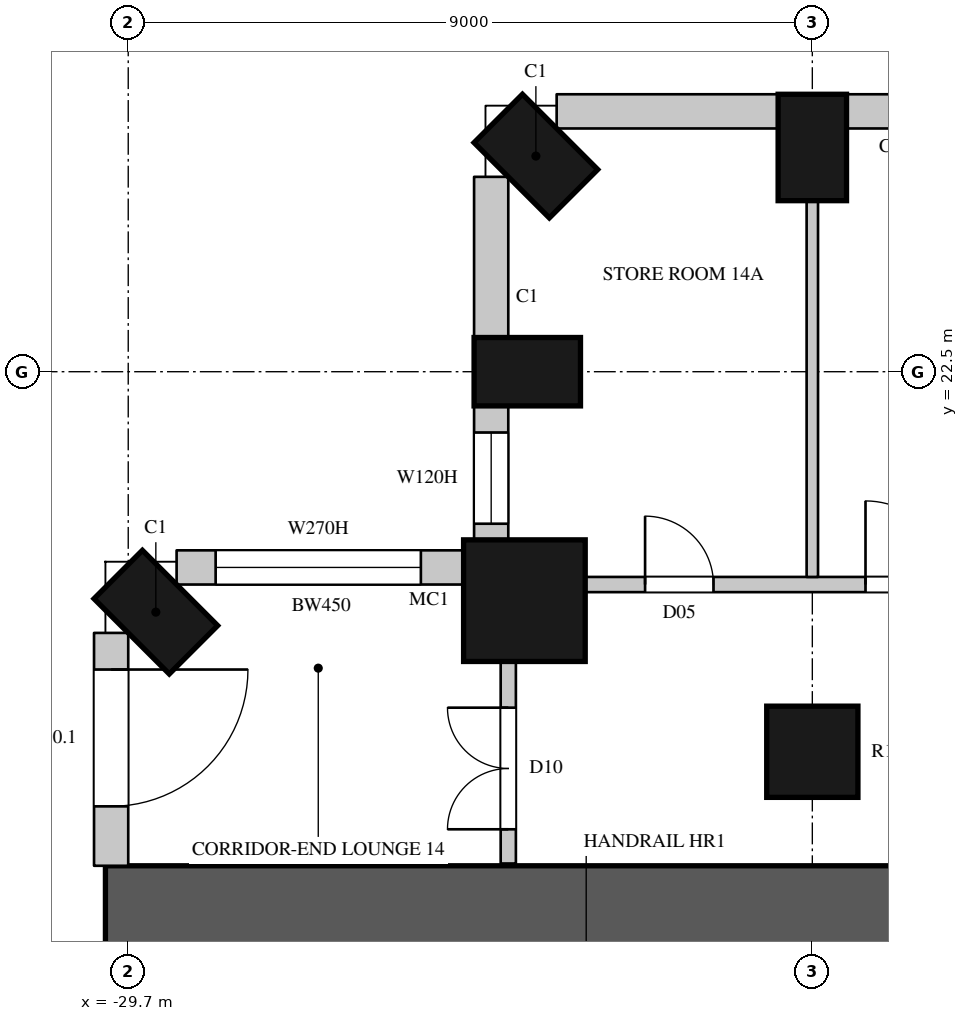
"""IFC4 building model, lengths in metres.
Left out: names, types, materials, properties, quantities, classifications, styles, units other than length and angle.
Written with IfcOpenShell. Run it as: python <this file> out.ifc"""

import sys

from ifc_helpers import new_model, si_unit, direction, frame, frame_2d, origin, origin_2d, place, context, subcontext, project, spatial, rectangle, circle, extrude, element, fill, save


model = new_model("IFC4")
c1 = context("Model", 3, precision=1e-05, world=origin(), true_north=direction((0.0, 1.0)))
c2 = subcontext(c1, "Body", "Model", "MODEL_VIEW")
j1 = project(units=[si_unit("LENGTHUNIT", "METRE"), si_unit("PLANEANGLEUNIT", "RADIAN")], contexts=[c1])
p1 = place(None, origin())
s1 = spatial("IfcSite", under=j1, at=p1, CompositionType="ELEMENT")
p2 = place(p1, origin())
s2 = spatial("IfcBuilding", under=s1, at=p2, CompositionType="ELEMENT")
p3 = place(p2, frame((0.0, 0.0, 80.7)))
s3 = spatial("IfcBuildingStorey", under=s2, at=p3, CompositionType="ELEMENT", Elevation=80.7)
for number, where, z_axis, x_axis in (
    (1, (-29.337, 19.337, 0.0), (0.0, 0.0, 1.0), (-0.707, -0.707, 0.0)),
    (2, (-20.7, 25.45, 0.0), (0.0, 0.0, 1.0), (-1.0, 0.0, 0.0)),
    (3, (-24.337, 25.337, 0.0), (0.0, 0.0, 1.0), (-0.707, -0.707, 0.0)),
    (4, (-24.45, 22.5, 0.0), (0.0, 0.0, 1.0), (0.0, -1.0, 0.0)),
):
    element("IfcColumn", number, at=place(p3, frame(where, z_axis=z_axis, x_axis=x_axis)), inside=s3, PredefinedType="COLUMN", context=c2, shape_type="SweptSolid", body=[
        extrude(rectangle(XDim=0.9, YDim=1.4, at=origin_2d()), origin(), (0.0, 0.0, 1.0), 3.6),
    ])
p4 = place(p3, frame((-24.488, 19.488, 0.0), z_axis=(0.0, 0.0, 1.0), x_axis=(1.0, 0.0, 0.0)))
e5 = element("IfcColumn", 5, at=p4, inside=s3, PredefinedType="COLUMN", context=c2, shape_type="SweptSolid", body=[
    extrude(circle(Radius=0.8, at=origin_2d()), origin(), (0.0, 0.0, 1.0), 3.6),
])
p5 = place(p3, frame((-20.7, 17.5, 0.0), z_axis=(0.0, 0.0, 1.0), x_axis=(1.0, 0.0, 0.0)))
e6 = element("IfcColumn", 6, at=p5, inside=s3, PredefinedType="COLUMN", context=c2, shape_type="SweptSolid", body=[
    extrude(circle(Radius=0.6, at=origin_2d()), origin(), (0.0, 0.0, 1.0), 3.6),
])
p6 = place(p3, frame((-29.925, 19.064, 0.0), z_axis=(0.0, 0.0, 1.0), x_axis=(0.0, -1.0, 0.0)))
e7 = element("IfcWall", 7, at=p6, inside=s3, PredefinedType="SOLIDWALL", context=c2, shape_type="SweptSolid", body=[
    extrude(rectangle(XDim=3.064, YDim=0.45, at=frame_2d((1.532, 0.0))), origin(), (0.0, 0.0, 1.0), 3.3),
])
p7 = place(p6, frame((0.482, 0.0, 0.0)))
e8 = element("IfcOpeningElement", 8, at=p7, cuts=e7, PredefinedType="OPENING", context=c2, shape_type="SweptSolid", body=[
    extrude(rectangle(XDim=1.8, YDim=2.4, at=frame_2d((0.9, 1.2))), frame((0.0, 0.235, 0.0), z_axis=(0.0, -1.0, 0.0), x_axis=(1.0, 0.0, 0.0)), (0.0, 0.0, 1.0), 0.47),
])
p8 = place(p3, frame((-12.15, 25.925, 0.0), z_axis=(0.0, 0.0, 1.0), x_axis=(-1.0, 0.0, 0.0)))
e9 = element("IfcWall", 9, at=p8, inside=s3, PredefinedType="SOLIDWALL", context=c2, shape_type="SweptSolid", body=[
    extrude(rectangle(XDim=8.1, YDim=0.45, at=frame_2d((4.05, 0.0))), origin(), (0.0, 0.0, 1.0), 3.3),
])
p9 = place(p8, frame((0.2, 0.0, 0.0)))
e10 = element("IfcOpeningElement", 10, at=p9, cuts=e9, PredefinedType="OPENING", context=c2, shape_type="SweptSolid", body=[
    extrude(rectangle(XDim=1.8, YDim=2.4, at=frame_2d((0.9, 1.2))), frame((0.0, 0.235, 0.0), z_axis=(0.0, -1.0, 0.0), x_axis=(1.0, 0.0, 0.0)), (0.0, 0.0, 1.0), 0.47),
])
p10 = place(p8, frame((2.2, 0.0, 1.05)))
e11 = element("IfcOpeningElement", 11, at=p10, cuts=e9, PredefinedType="OPENING", context=c2, shape_type="SweptSolid", body=[
    extrude(rectangle(XDim=1.2, YDim=2.0, at=frame_2d((0.6, 1.0))), frame((0.0, 0.235, 0.0), z_axis=(0.0, -1.0, 0.0), x_axis=(1.0, 0.0, 0.0)), (0.0, 0.0, 1.0), 0.47),
])
p11 = place(p8, frame((5.4, 0.0, 0.0)))
e12 = element("IfcOpeningElement", 12, at=p11, cuts=e9, PredefinedType="OPENING", context=c2, shape_type="SweptSolid", body=[
    extrude(rectangle(XDim=1.8, YDim=2.4, at=frame_2d((0.9, 1.2))), frame((0.0, 0.235, 0.0), z_axis=(0.0, -1.0, 0.0), x_axis=(1.0, 0.0, 0.0)), (0.0, 0.0, 1.0), 0.47),
])
p12 = place(p3, frame((-21.15, 25.925, 0.0), z_axis=(0.0, 0.0, 1.0), x_axis=(-1.0, 0.0, 0.0)))
e13 = element("IfcWall", 13, at=p12, inside=s3, PredefinedType="SOLIDWALL", context=c2, shape_type="SweptSolid", body=[
    extrude(rectangle(XDim=2.914, YDim=0.45, at=frame_2d((1.457, 0.0))), origin(), (0.0, 0.0, 1.0), 3.3),
])
p13 = place(p3, frame((-24.925, 25.064, 0.0), z_axis=(0.0, 0.0, 1.0), x_axis=(0.0, -1.0, 0.0)))
e14 = element("IfcWall", 14, at=p13, inside=s3, PredefinedType="SOLIDWALL", context=c2, shape_type="SweptSolid", body=[
    extrude(rectangle(XDim=2.114, YDim=0.45, at=frame_2d((1.057, 0.0))), origin(), (0.0, 0.0, 1.0), 3.3),
])
p14 = place(p3, frame((-24.925, 22.05, 0.0), z_axis=(0.0, 0.0, 1.0), x_axis=(0.0, -1.0, 0.0)))
e15 = element("IfcWall", 15, at=p14, inside=s3, PredefinedType="SOLIDWALL", context=c2, shape_type="SweptSolid", body=[
    extrude(rectangle(XDim=1.792, YDim=0.45, at=frame_2d((0.896, 0.0))), origin(), (0.0, 0.0, 1.0), 3.3),
])
p15 = place(p14, frame((0.35, 0.0, 1.05)))
e16 = element("IfcOpeningElement", 16, at=p15, cuts=e15, PredefinedType="OPENING", context=c2, shape_type="SweptSolid", body=[
    extrude(rectangle(XDim=1.2, YDim=2.0, at=frame_2d((0.6, 1.0))), frame((0.0, 0.235, 0.0), z_axis=(0.0, -1.0, 0.0), x_axis=(1.0, 0.0, 0.0)), (0.0, 0.0, 1.0), 0.47),
])
p16 = place(p3, frame((-25.259, 19.925, 0.0), z_axis=(0.0, 0.0, 1.0), x_axis=(-1.0, 0.0, 0.0)))
e17 = element("IfcWall", 17, at=p16, inside=s3, PredefinedType="SOLIDWALL", context=c2, shape_type="SweptSolid", body=[
    extrude(rectangle(XDim=3.805, YDim=0.45, at=frame_2d((1.903, 0.0))), origin(), (0.0, 0.0, 1.0), 3.3),
])
p17 = place(p16, frame((0.592, 0.0, 1.05)))
e18 = element("IfcOpeningElement", 18, at=p17, cuts=e17, PredefinedType="OPENING", context=c2, shape_type="SweptSolid", body=[
    extrude(rectangle(XDim=2.7, YDim=2.0, at=frame_2d((1.35, 1.0))), frame((0.0, 0.235, 0.0), z_axis=(0.0, -1.0, 0.0), x_axis=(1.0, 0.0, 0.0)), (0.0, 0.0, 1.0), 0.47),
])
p18 = place(p3, frame((-30.0, 15.4, 0.0), z_axis=(0.0, 0.0, 1.0), x_axis=(1.0, 0.0, 0.0)))
e19 = element("IfcWall", 19, at=p18, inside=s3, PredefinedType="SHEAR", context=c2, shape_type="SweptSolid", body=[
    extrude(rectangle(XDim=16.0, YDim=1.2, at=frame_2d((8.0, 0.0))), origin(), (0.0, 0.0, 1.0), 3.6),
])
p19 = place(p18, frame((13.4, 0.0, 0.0)))
e20 = element("IfcOpeningElement", 20, at=p19, cuts=e19, PredefinedType="OPENING", context=c2, shape_type="SweptSolid", body=[
    extrude(rectangle(XDim=1.5, YDim=2.4, at=frame_2d((0.75, 1.2))), frame((0.0, 0.61, 0.0), z_axis=(0.0, -1.0, 0.0), x_axis=(1.0, 0.0, 0.0)), (0.0, 0.0, 1.0), 1.22),
])
p20 = place(p3, frame((-24.7, 16.03, 0.0), z_axis=(0.0, 0.0, 1.0), x_axis=(0.0, 1.0, 0.0)))
e21 = element("IfcWall", 21, at=p20, inside=s3, PredefinedType="PARTITIONING", context=c2, shape_type="SweptSolid", body=[
    extrude(rectangle(XDim=2.67, YDim=0.2, at=frame_2d((1.335, 0.0))), origin(), (0.0, 0.0, 1.0), 3.3),
])
p21 = place(p20, frame((0.45, 0.0, 0.0)))
e22 = element("IfcOpeningElement", 22, at=p21, cuts=e21, PredefinedType="OPENING", context=c2, shape_type="SweptSolid", body=[
    extrude(rectangle(XDim=1.6, YDim=2.4, at=frame_2d((0.8, 1.2))), frame((0.0, 0.11, 0.0), z_axis=(0.0, -1.0, 0.0), x_axis=(1.0, 0.0, 0.0)), (0.0, 0.0, 1.0), 0.22),
])
p22 = place(p3, frame((-23.7, 19.7, 0.0), z_axis=(0.0, 0.0, 1.0), x_axis=(1.0, 0.0, 0.0)))
e23 = element("IfcWall", 23, at=p22, inside=s3, PredefinedType="PARTITIONING", context=c2, shape_type="SweptSolid", body=[
    extrude(rectangle(XDim=5.1, YDim=0.2, at=frame_2d((2.55, 0.0))), origin(), (0.0, 0.0, 1.0), 3.3),
])
p23 = place(p22, frame((0.8, 0.0, 0.0)))
e24 = element("IfcOpeningElement", 24, at=p23, cuts=e23, PredefinedType="OPENING", context=c2, shape_type="SweptSolid", body=[
    extrude(rectangle(XDim=0.9, YDim=2.2, at=frame_2d((0.45, 1.1))), frame((0.0, 0.11, 0.0), z_axis=(0.0, -1.0, 0.0), x_axis=(1.0, 0.0, 0.0)), (0.0, 0.0, 1.0), 0.22),
])
p24 = place(p22, frame((3.7, 0.0, 0.0)))
e25 = element("IfcOpeningElement", 25, at=p24, cuts=e23, PredefinedType="OPENING", context=c2, shape_type="SweptSolid", body=[
    extrude(rectangle(XDim=1.1, YDim=2.4, at=frame_2d((0.55, 1.2))), frame((0.0, 0.11, 0.0), z_axis=(0.0, -1.0, 0.0), x_axis=(1.0, 0.0, 0.0)), (0.0, 0.0, 1.0), 0.22),
])
p25 = place(p3, frame((-20.7, 19.8, 0.0), z_axis=(0.0, 0.0, 1.0), x_axis=(0.0, 1.0, 0.0)))
e26 = element("IfcWall", 26, at=p25, inside=s3, PredefinedType="PARTITIONING", context=c2, shape_type="SweptSolid", body=[
    extrude(rectangle(XDim=4.95, YDim=0.15, at=frame_2d((2.475, 0.0))), origin(), (0.0, 0.0, 1.0), 2.75),
])
p26 = place(p7, origin())
e27 = element("IfcDoor", 27, at=p26, inside=s3, OperationType="SLIDING_TO_LEFT", PredefinedType="DOOR", context=c2, shape_type="SweptSolid", body=[
    extrude(rectangle(XDim=1.8, YDim=2.4, at=frame_2d((0.9, 1.2))), frame((0.0, 0.13, 0.0), z_axis=(0.0, -1.0, 0.0), x_axis=(1.0, 0.0, 0.0)), (0.0, 0.0, 1.0), 0.05),
])
fill(e8, e27)
p27 = place(p15, origin())
e28 = element("IfcWindow", 28, at=p27, inside=s3, PartitioningType="SINGLE_PANEL", PredefinedType="WINDOW", context=c2, shape_type="SweptSolid", body=[
    extrude(rectangle(XDim=1.2, YDim=2.0, at=frame_2d((0.6, 1.0))), frame((0.0, 0.135, 0.0), z_axis=(0.0, -1.0, 0.0), x_axis=(1.0, 0.0, 0.0)), (0.0, 0.0, 1.0), 0.06),
])
fill(e16, e28)
p28 = place(p17, origin())
e29 = element("IfcWindow", 29, at=p28, inside=s3, PartitioningType="SINGLE_PANEL", PredefinedType="WINDOW", context=c2, shape_type="SweptSolid", body=[
    extrude(rectangle(XDim=2.7, YDim=2.0, at=frame_2d((1.35, 1.0))), frame((0.0, 0.135, 0.0), z_axis=(0.0, -1.0, 0.0), x_axis=(1.0, 0.0, 0.0)), (0.0, 0.0, 1.0), 0.06),
])
fill(e18, e29)
p29 = place(p23, origin())
e30 = element("IfcDoor", 30, at=p29, inside=s3, OperationType="SINGLE_SWING_LEFT", PredefinedType="DOOR", context=c2, shape_type="SweptSolid", body=[
    extrude(rectangle(XDim=0.9, YDim=2.2, at=frame_2d((0.45, 1.1))), frame((0.0, 0.025, 0.0), z_axis=(0.0, -1.0, 0.0), x_axis=(1.0, 0.0, 0.0)), (0.0, 0.0, 1.0), 0.05),
])
fill(e24, e30)
p30 = place(p21, origin())
e31 = element("IfcDoor", 31, at=p30, inside=s3, OperationType="DOUBLE_DOOR_SINGLE_SWING", PredefinedType="DOOR", context=c2, shape_type="SweptSolid", body=[
    extrude(rectangle(XDim=1.6, YDim=2.4, at=frame_2d((0.8, 1.2))), frame((0.0, 0.025, 0.0), z_axis=(0.0, -1.0, 0.0), x_axis=(1.0, 0.0, 0.0)), (0.0, 0.0, 1.0), 0.05),
])
fill(e22, e31)
p31 = place(p24, origin())
e32 = element("IfcDoor", 32, at=p31, inside=s3, OperationType="SINGLE_SWING_LEFT", PredefinedType="DOOR", context=c2, shape_type="SweptSolid", body=[
    extrude(rectangle(XDim=1.1, YDim=2.4, at=frame_2d((0.55, 1.2))), frame((0.0, 0.025, 0.0), z_axis=(0.0, -1.0, 0.0), x_axis=(1.0, 0.0, 0.0)), (0.0, 0.0, 1.0), 0.05),
])
fill(e25, e32)
save(model, sys.argv[1])
